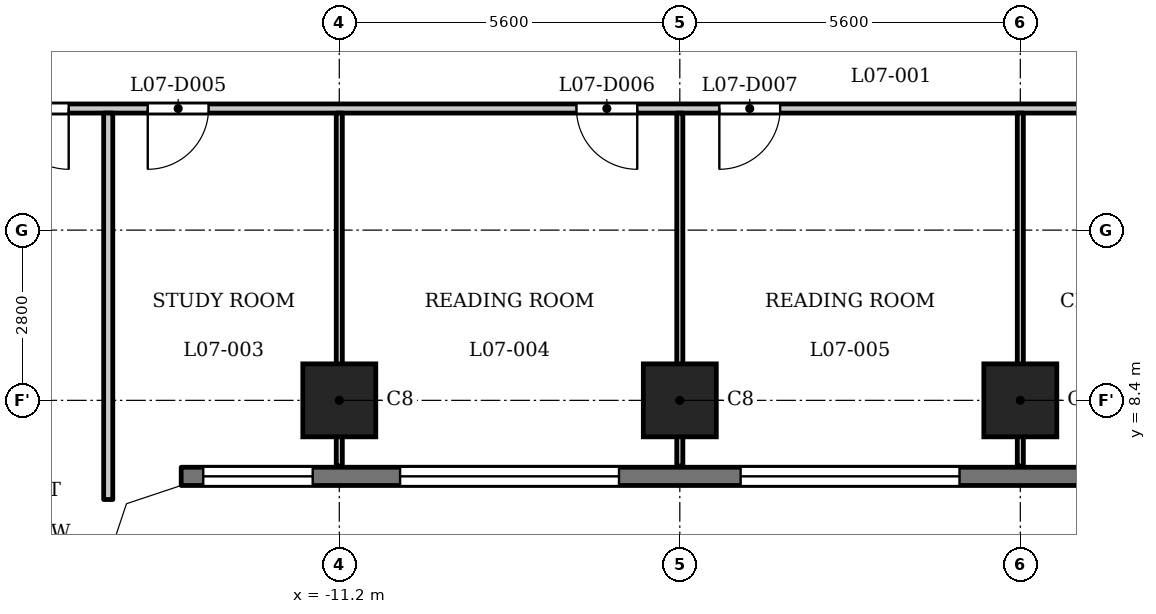
"""IFC4 building model, lengths in metres.
Left out: names, types, materials, properties, quantities, classifications, styles, units other than length and angle.
Written with IfcOpenShell. Run it as: python <this file> out.ifc"""

import sys

from ifc_helpers import new_model, si_unit, direction, frame, frame_2d, origin, origin_2d, place, context, subcontext, project, spatial, polyline, rectangle, outline, extrude, element, fill, save


model = new_model("IFC4")
c1 = context("Model", 3, precision=1e-05, world=origin(), true_north=direction((0.0, 1.0)))
c2 = subcontext(c1, "Body", "Model", "MODEL_VIEW")
j1 = project(units=[si_unit("LENGTHUNIT", "METRE"), si_unit("PLANEANGLEUNIT", "RADIAN")], contexts=[c1])
p1 = place(None, origin())
s1 = spatial("IfcSite", under=j1, at=p1, CompositionType="ELEMENT")
p2 = place(p1, origin())
s2 = spatial("IfcBuilding", under=s1, at=p2, CompositionType="ELEMENT")
p3 = place(p2, frame((0.0, 0.0, 34.0)))
s3 = spatial("IfcBuildingStorey", under=s2, at=p3, CompositionType="ELEMENT", Elevation=34.0)
for number, where, z_axis, x_axis in (
    (1, (-11.2, 8.4, 0.0), (0.0, 0.0, 1.0), (1.0, 0.0, 0.0)),
    (2, (-5.6, 8.4, 0.0), (0.0, 0.0, 1.0), (1.0, 0.0, 0.0)),
    (3, (0.0, 8.4, 0.0), (0.0, 0.0, 1.0), (1.0, 0.0, 0.0)),
):
    element("IfcColumn", number, at=place(p3, frame(where, z_axis=z_axis, x_axis=x_axis)), inside=s3, PredefinedType="COLUMN", context=c2, shape_type="SweptSolid", body=[
        extrude(rectangle(XDim=1.2, YDim=1.2, at=origin_2d()), origin(), (0.0, 0.0, 1.0), 3.5),
    ])
p4 = place(p3, frame((-13.8, 7.15, 0.0), z_axis=(0.0, 0.0, 1.0), x_axis=(1.0, 0.0, 0.0)))
e4 = element("IfcWall", 4, at=p4, inside=s3, PredefinedType="SOLIDWALL", context=c2, shape_type="SweptSolid", body=[
    extrude(rectangle(XDim=27.6, YDim=0.3, at=frame_2d((13.8, 0.0))), origin(), (0.0, 0.0, 1.0), 3.2),
])
p5 = place(p4, frame((0.363, 0.0, 0.9)))
e5 = element("IfcOpeningElement", 5, at=p5, cuts=e4, PredefinedType="OPENING", context=c2, shape_type="SweptSolid", body=[
    extrude(rectangle(XDim=1.8, YDim=1.25, at=frame_2d((0.9, 0.625))), frame((0.0, 0.16, 0.0), z_axis=(0.0, -1.0, 0.0), x_axis=(1.0, 0.0, 0.0)), (0.0, 0.0, 1.0), 0.32),
])
p6 = place(p4, frame((3.6, 0.0, 1.2)))
e6 = element("IfcOpeningElement", 6, at=p6, cuts=e4, PredefinedType="OPENING", context=c2, shape_type="SweptSolid", body=[
    extrude(rectangle(XDim=3.6, YDim=0.95, at=frame_2d((1.8, 0.475))), frame((0.0, 0.16, 0.0), z_axis=(0.0, -1.0, 0.0), x_axis=(1.0, 0.0, 0.0)), (0.0, 0.0, 1.0), 0.32),
])
p7 = place(p4, frame((9.2, 0.0, 1.2)))
e7 = element("IfcOpeningElement", 7, at=p7, cuts=e4, PredefinedType="OPENING", context=c2, shape_type="SweptSolid", body=[
    extrude(rectangle(XDim=3.6, YDim=0.95, at=frame_2d((1.8, 0.475))), frame((0.0, 0.16, 0.0), z_axis=(0.0, -1.0, 0.0), x_axis=(1.0, 0.0, 0.0)), (0.0, 0.0, 1.0), 0.32),
])
p8 = place(p4, frame((14.8, 0.0, 1.2)))
e8 = element("IfcOpeningElement", 8, at=p8, cuts=e4, PredefinedType="OPENING", context=c2, shape_type="SweptSolid", body=[
    extrude(rectangle(XDim=3.6, YDim=0.95, at=frame_2d((1.8, 0.475))), frame((0.0, 0.16, 0.0), z_axis=(0.0, -1.0, 0.0), x_axis=(1.0, 0.0, 0.0)), (0.0, 0.0, 1.0), 0.32),
])
p9 = place(p4, frame((20.4, 0.0, 1.2)))
e9 = element("IfcOpeningElement", 9, at=p9, cuts=e4, PredefinedType="OPENING", context=c2, shape_type="SweptSolid", body=[
    extrude(rectangle(XDim=3.6, YDim=0.95, at=frame_2d((1.8, 0.475))), frame((0.0, 0.16, 0.0), z_axis=(0.0, -1.0, 0.0), x_axis=(1.0, 0.0, 0.0)), (0.0, 0.0, 1.0), 0.32),
])
p10 = place(p4, frame((25.438, 0.0, 0.9)))
e10 = element("IfcOpeningElement", 10, at=p10, cuts=e4, PredefinedType="OPENING", context=c2, shape_type="SweptSolid", body=[
    extrude(rectangle(XDim=1.8, YDim=1.25, at=frame_2d((0.9, 0.625))), frame((0.0, 0.16, 0.0), z_axis=(0.0, -1.0, 0.0), x_axis=(1.0, 0.0, 0.0)), (0.0, 0.0, 1.0), 0.32),
])
p11 = place(p3, frame((-17.4, 13.2, 0.0), z_axis=(0.0, 0.0, 1.0), x_axis=(1.0, 0.0, 0.0)))
e11 = element("IfcWall", 11, at=p11, inside=s3, PredefinedType="PARTITIONING", context=c2, shape_type="SweptSolid", body=[
    extrude(rectangle(XDim=34.8, YDim=0.15, at=frame_2d((17.4, 0.0))), origin(), (0.0, 0.0, 1.0), 3.2),
])
p12 = place(p11, frame((0.75, 0.0, 0.0)))
e12 = element("IfcOpeningElement", 12, at=p12, cuts=e11, PredefinedType="OPENING", context=c2, shape_type="SweptSolid", body=[
    extrude(rectangle(XDim=1.0, YDim=2.1, at=frame_2d((0.5, 1.05))), frame((0.0, 0.085, 0.0), z_axis=(0.0, -1.0, 0.0), x_axis=(1.0, 0.0, 0.0)), (0.0, 0.0, 1.0), 0.17),
])
p13 = place(p11, frame((33.15, 0.0, 0.0)))
e13 = element("IfcOpeningElement", 13, at=p13, cuts=e11, PredefinedType="OPENING", context=c2, shape_type="SweptSolid", body=[
    extrude(rectangle(XDim=1.0, YDim=2.1, at=frame_2d((0.5, 1.05))), frame((0.0, 0.085, 0.0), z_axis=(0.0, -1.0, 0.0), x_axis=(1.0, 0.0, 0.0)), (0.0, 0.0, 1.0), 0.17),
])
p14 = place(p11, frame((3.05, 0.0, 0.0)))
e14 = element("IfcOpeningElement", 14, at=p14, cuts=e11, PredefinedType="OPENING", context=c2, shape_type="SweptSolid", body=[
    extrude(rectangle(XDim=1.0, YDim=2.1, at=frame_2d((0.5, 1.05))), frame((0.0, 0.085, 0.0), z_axis=(0.0, -1.0, 0.0), x_axis=(1.0, 0.0, 0.0)), (0.0, 0.0, 1.0), 0.17),
])
p15 = place(p11, frame((10.1, 0.0, 0.0)))
e15 = element("IfcOpeningElement", 15, at=p15, cuts=e11, PredefinedType="OPENING", context=c2, shape_type="SweptSolid", body=[
    extrude(rectangle(XDim=1.0, YDim=2.1, at=frame_2d((0.5, 1.05))), frame((0.0, 0.085, 0.0), z_axis=(0.0, -1.0, 0.0), x_axis=(1.0, 0.0, 0.0)), (0.0, 0.0, 1.0), 0.17),
])
p16 = place(p11, frame((12.45, 0.0, 0.0)))
e16 = element("IfcOpeningElement", 16, at=p16, cuts=e11, PredefinedType="OPENING", context=c2, shape_type="SweptSolid", body=[
    extrude(rectangle(XDim=1.0, YDim=2.1, at=frame_2d((0.5, 1.05))), frame((0.0, 0.085, 0.0), z_axis=(0.0, -1.0, 0.0), x_axis=(1.0, 0.0, 0.0)), (0.0, 0.0, 1.0), 0.17),
])
p17 = place(p11, frame((21.3, 0.0, 0.0)))
e17 = element("IfcOpeningElement", 17, at=p17, cuts=e11, PredefinedType="OPENING", context=c2, shape_type="SweptSolid", body=[
    extrude(rectangle(XDim=1.0, YDim=2.1, at=frame_2d((0.5, 1.05))), frame((0.0, 0.085, 0.0), z_axis=(0.0, -1.0, 0.0), x_axis=(1.0, 0.0, 0.0)), (0.0, 0.0, 1.0), 0.17),
])
p18 = place(p11, frame((23.65, 0.0, 0.0)))
e18 = element("IfcOpeningElement", 18, at=p18, cuts=e11, PredefinedType="OPENING", context=c2, shape_type="SweptSolid", body=[
    extrude(rectangle(XDim=1.0, YDim=2.1, at=frame_2d((0.5, 1.05))), frame((0.0, 0.085, 0.0), z_axis=(0.0, -1.0, 0.0), x_axis=(1.0, 0.0, 0.0)), (0.0, 0.0, 1.0), 0.17),
])
p19 = place(p11, frame((30.75, 0.0, 0.0)))
e19 = element("IfcOpeningElement", 19, at=p19, cuts=e11, PredefinedType="OPENING", context=c2, shape_type="SweptSolid", body=[
    extrude(rectangle(XDim=1.0, YDim=2.1, at=frame_2d((0.5, 1.05))), frame((0.0, 0.085, 0.0), z_axis=(0.0, -1.0, 0.0), x_axis=(1.0, 0.0, 0.0)), (0.0, 0.0, 1.0), 0.17),
])
p20 = place(p3, frame((-15.0, 6.769, 0.0), z_axis=(0.0, 0.0, 1.0), x_axis=(0.0, 1.0, 0.0)))
e20 = element("IfcWall", 20, at=p20, inside=s3, PredefinedType="PARTITIONING", context=c2, shape_type="SweptSolid", body=[
    extrude(rectangle(XDim=6.356, YDim=0.15, at=frame_2d((3.178, 0.0))), origin(), (0.0, 0.0, 1.0), 3.2),
])
for number, where, z_axis, x_axis in (
    (21, (-11.2, 7.32, 0.0), (0.0, 0.0, 1.0), (0.0, 1.0, 0.0)),
    (22, (-5.6, 7.32, 0.0), (0.0, 0.0, 1.0), (0.0, 1.0, 0.0)),
    (23, (0.0, 7.32, 0.0), (0.0, 0.0, 1.0), (0.0, 1.0, 0.0)),
):
    element("IfcWall", number, at=place(p3, frame(where, z_axis=z_axis, x_axis=x_axis)), inside=s3, PredefinedType="PARTITIONING", context=c2, shape_type="SweptSolid", body=[
        extrude(rectangle(XDim=5.805, YDim=0.1, at=frame_2d((2.902, 0.0))), origin(), (0.0, 0.0, 1.0), 3.2),
    ])
p21 = place(p3, origin())
e24 = element("IfcWall", 24, at=p21, inside=s3, PredefinedType="SOLIDWALL", context=c2, shape_type="SweptSolid", body=[
    extrude(outline(polyline([(-13.849, 7.3), (-14.937, 6.937), (-15.3, 5.849), (-15.3, 5.8), (-15.0, 5.8), (-14.7, 6.7), (-13.8, 7.0), (-13.8, 7.3), (-13.849, 7.3)])), origin(), (0.0, 0.0, 1.0), 3.2),
])
p22 = place(p12, origin())
e25 = element("IfcDoor", 25, at=p22, inside=s3, OperationType="SINGLE_SWING_RIGHT", PredefinedType="DOOR", context=c2, shape_type="SweptSolid", body=[
    extrude(rectangle(XDim=1.0, YDim=2.1, at=frame_2d((0.5, 1.05))), frame((0.0, 0.025, 0.0), z_axis=(0.0, -1.0, 0.0), x_axis=(1.0, 0.0, 0.0)), (0.0, 0.0, 1.0), 0.05),
])
fill(e12, e25)
p23 = place(p14, origin())
e26 = element("IfcDoor", 26, at=p23, inside=s3, OperationType="SINGLE_SWING_LEFT", PredefinedType="DOOR", context=c2, shape_type="SweptSolid", body=[
    extrude(rectangle(XDim=1.0, YDim=2.1, at=frame_2d((0.5, 1.05))), frame((0.0, 0.025, 0.0), z_axis=(0.0, -1.0, 0.0), x_axis=(1.0, 0.0, 0.0)), (0.0, 0.0, 1.0), 0.05),
])
fill(e14, e26)
p24 = place(p15, origin())
e27 = element("IfcDoor", 27, at=p24, inside=s3, OperationType="SINGLE_SWING_RIGHT", PredefinedType="DOOR", context=c2, shape_type="SweptSolid", body=[
    extrude(rectangle(XDim=1.0, YDim=2.1, at=frame_2d((0.5, 1.05))), frame((0.0, 0.025, 0.0), z_axis=(0.0, -1.0, 0.0), x_axis=(1.0, 0.0, 0.0)), (0.0, 0.0, 1.0), 0.05),
])
fill(e15, e27)
p25 = place(p16, origin())
e28 = element("IfcDoor", 28, at=p25, inside=s3, OperationType="SINGLE_SWING_LEFT", PredefinedType="DOOR", context=c2, shape_type="SweptSolid", body=[
    extrude(rectangle(XDim=1.0, YDim=2.1, at=frame_2d((0.5, 1.05))), frame((0.0, 0.025, 0.0), z_axis=(0.0, -1.0, 0.0), x_axis=(1.0, 0.0, 0.0)), (0.0, 0.0, 1.0), 0.05),
])
fill(e16, e28)
p26 = place(p5, origin())
e29 = element("IfcWindow", 29, at=p26, inside=s3, PartitioningType="SINGLE_PANEL", PredefinedType="WINDOW", context=c2, shape_type="SweptSolid", body=[
    extrude(rectangle(XDim=1.8, YDim=1.25, at=frame_2d((0.9, 0.625))), frame((0.0, 0.03, 0.0), z_axis=(0.0, -1.0, 0.0), x_axis=(1.0, 0.0, 0.0)), (0.0, 0.0, 1.0), 0.06),
])
fill(e5, e29)
p27 = place(p6, origin())
e30 = element("IfcWindow", 30, at=p27, inside=s3, PartitioningType="SINGLE_PANEL", PredefinedType="WINDOW", context=c2, shape_type="SweptSolid", body=[
    extrude(rectangle(XDim=3.6, YDim=0.95, at=frame_2d((1.8, 0.475))), frame((0.0, 0.03, 0.0), z_axis=(0.0, -1.0, 0.0), x_axis=(1.0, 0.0, 0.0)), (0.0, 0.0, 1.0), 0.06),
])
fill(e6, e30)
p28 = place(p7, origin())
e31 = element("IfcWindow", 31, at=p28, inside=s3, PartitioningType="SINGLE_PANEL", PredefinedType="WINDOW", context=c2, shape_type="SweptSolid", body=[
    extrude(rectangle(XDim=3.6, YDim=0.95, at=frame_2d((1.8, 0.475))), frame((0.0, 0.03, 0.0), z_axis=(0.0, -1.0, 0.0), x_axis=(1.0, 0.0, 0.0)), (0.0, 0.0, 1.0), 0.06),
])
fill(e7, e31)
save(model, sys.argv[1])
